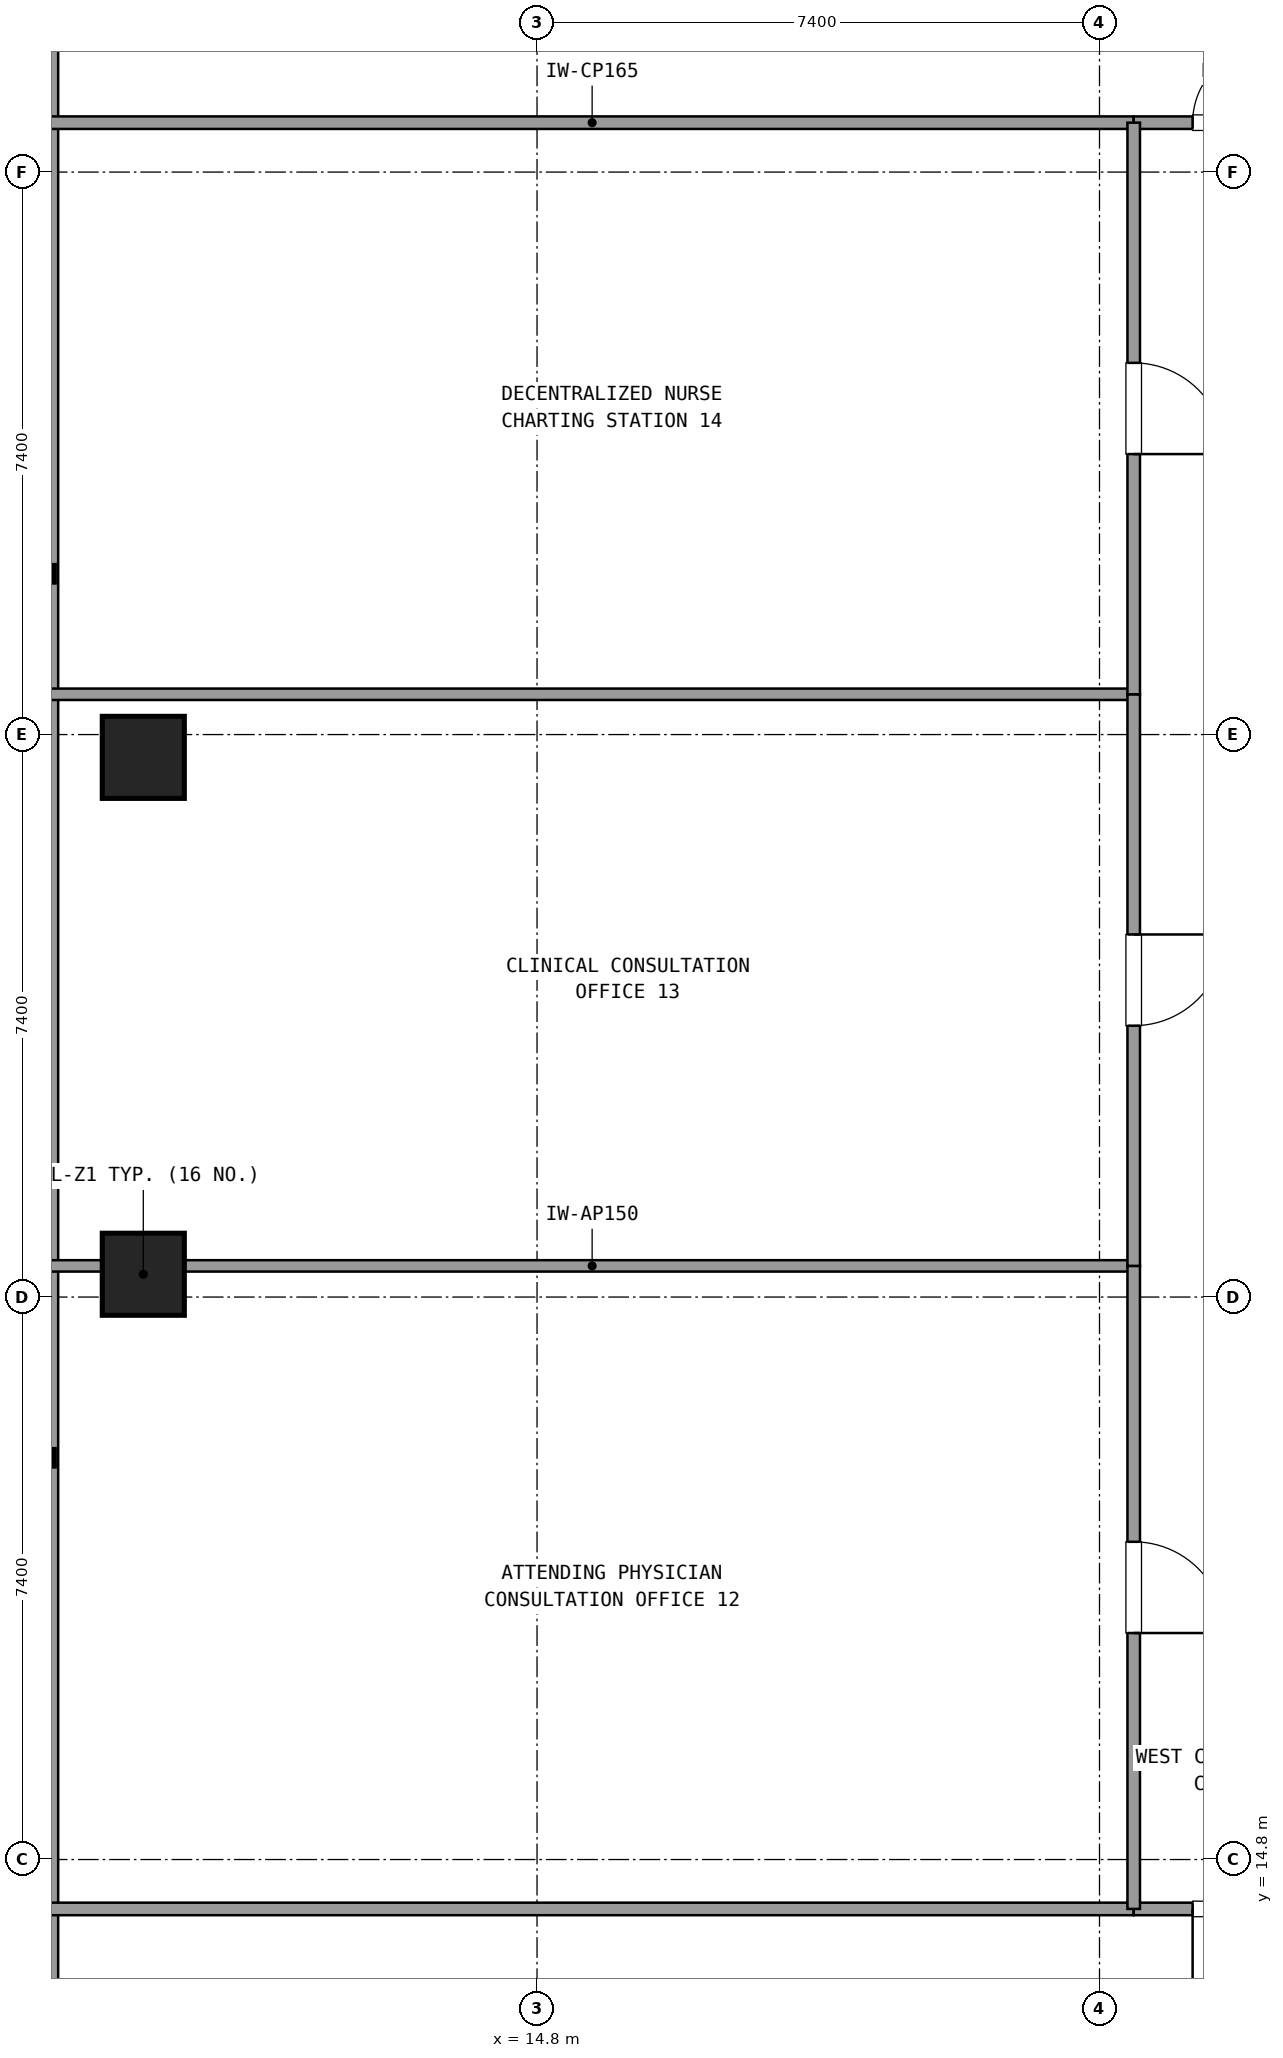
"""IFC4 building model, lengths in metres.
Left out: names, types, materials, properties, quantities, classifications, styles, units other than length and angle.
Written with IfcOpenShell. Run it as: python <this file> out.ifc"""

import sys

from ifc_helpers import new_model, si_unit, direction, frame, frame_2d, origin, origin_2d, place, context, subcontext, project, spatial, rectangle, extrude, element, fill, save


model = new_model("IFC4")
c1 = context("Model", 3, precision=1e-05, world=origin(), true_north=direction((0.0, 1.0)))
c2 = subcontext(c1, "Body", "Model", "MODEL_VIEW")
j1 = project(units=[si_unit("LENGTHUNIT", "METRE"), si_unit("PLANEANGLEUNIT", "RADIAN")], contexts=[c1])
p1 = place(None, origin())
s1 = spatial("IfcSite", under=j1, at=p1, CompositionType="ELEMENT")
p2 = place(p1, origin())
s2 = spatial("IfcBuilding", under=s1, at=p2, CompositionType="ELEMENT")
p3 = place(p2, frame((0.0, 0.0, 31.14)))
s3 = spatial("IfcBuildingStorey", under=s2, at=p3, CompositionType="ELEMENT", Elevation=31.14)
for number, where, z_axis, x_axis in (
    (1, (9.62, 22.5, 0.0), (0.0, 0.0, 1.0), (1.0, 0.0, 0.0)),
    (2, (9.62, 29.3, 0.0), (0.0, 0.0, 1.0), (1.0, 0.0, 0.0)),
):
    element("IfcColumn", number, at=place(p3, frame(where, z_axis=z_axis, x_axis=x_axis)), inside=s3, PredefinedType="COLUMN", context=c2, shape_type="SweptSolid", body=[
        extrude(rectangle(XDim=1.08, YDim=1.08, at=origin_2d()), origin(), (0.0, 0.0, 1.0), 3.6),
    ])
p4 = place(p3, frame((8.38, 43.345, 0.0), z_axis=(0.0, 0.0, 1.0), x_axis=(0.0, -1.0, 0.0)))
e3 = element("IfcWall", 3, at=p4, inside=s3, PredefinedType="SOLIDWALL", context=c2, shape_type="SweptSolid", body=[
    extrude(rectangle(XDim=34.89, YDim=0.24, at=frame_2d((17.445, 0.0))), origin(), (0.0, 0.0, 1.0), 0.85),
])
for number, where, z_axis, x_axis in (
    (4, (8.4, 37.65, 0.0), (0.0, 0.0, 1.0), (1.0, 0.0, 0.0)),
    (5, (8.4, 14.15, 0.0), (0.0, 0.0, 1.0), (1.0, 0.0, 0.0)),
):
    element("IfcWall", number, at=place(p3, frame(where, z_axis=z_axis, x_axis=x_axis)), inside=s3, PredefinedType="PARTITIONING", context=c2, shape_type="SweptSolid", body=[
        extrude(rectangle(XDim=14.25, YDim=0.165, at=frame_2d((7.125, 0.0))), origin(), (0.0, 0.0, 1.0), 2.61),
    ])
p5 = place(p3, frame((22.65, 37.65, 0.0), z_axis=(0.0, 0.0, 1.0), x_axis=(1.0, 0.0, 0.0)))
e6 = element("IfcWall", 6, at=p5, inside=s3, PredefinedType="PARTITIONING", context=c2, shape_type="SweptSolid", body=[
    extrude(rectangle(XDim=2.55, YDim=0.165, at=frame_2d((1.275, 0.0))), origin(), (0.0, 0.0, 1.0), 2.61),
])
p6 = place(p5, frame((0.775, 0.0, 0.0)))
e7 = element("IfcOpeningElement", 7, at=p6, cuts=e6, PredefinedType="OPENING", context=c2, shape_type="SweptSolid", body=[
    extrude(rectangle(XDim=1.0, YDim=2.15, at=frame_2d((0.5, 1.075))), frame((0.0, 0.093, 0.0), z_axis=(0.0, -1.0, 0.0), x_axis=(1.0, 0.0, 0.0)), (0.0, 0.0, 1.0), 0.185),
])
p7 = place(p3, frame((22.65, 14.15, 0.0), z_axis=(0.0, 0.0, 1.0), x_axis=(1.0, 0.0, 0.0)))
e8 = element("IfcWall", 8, at=p7, inside=s3, PredefinedType="PARTITIONING", context=c2, shape_type="SweptSolid", body=[
    extrude(rectangle(XDim=2.55, YDim=0.165, at=frame_2d((1.275, 0.0))), origin(), (0.0, 0.0, 1.0), 2.61),
])
p8 = place(p7, frame((0.775, 0.0, 0.0)))
e9 = element("IfcOpeningElement", 9, at=p8, cuts=e8, PredefinedType="OPENING", context=c2, shape_type="SweptSolid", body=[
    extrude(rectangle(XDim=1.0, YDim=2.15, at=frame_2d((0.5, 1.075))), frame((0.0, 0.093, 0.0), z_axis=(0.0, -1.0, 0.0), x_axis=(1.0, 0.0, 0.0)), (0.0, 0.0, 1.0), 0.185),
])
p9 = place(p3, frame((22.65, 22.61, 0.0), z_axis=(0.0, 0.0, 1.0), x_axis=(-1.0, 0.0, 0.0)))
e10 = element("IfcWall", 10, at=p9, inside=s3, PredefinedType="PARTITIONING", context=c2, shape_type="SweptSolid", body=[
    extrude(rectangle(XDim=14.25, YDim=0.15, at=frame_2d((7.125, 0.0))), origin(), (0.0, 0.0, 1.0), 2.61),
])
p10 = place(p3, frame((22.65, 14.15, 0.0), z_axis=(0.0, 0.0, 1.0), x_axis=(0.0, 1.0, 0.0)))
e11 = element("IfcWall", 11, at=p10, inside=s3, PredefinedType="PARTITIONING", context=c2, shape_type="SweptSolid", body=[
    extrude(rectangle(XDim=8.46, YDim=0.165, at=frame_2d((4.23, 0.0))), origin(), (0.0, 0.0, 1.0), 2.61),
])
p11 = place(p10, frame((3.63, 0.0, 0.0)))
e12 = element("IfcOpeningElement", 12, at=p11, cuts=e11, PredefinedType="OPENING", context=c2, shape_type="SweptSolid", body=[
    extrude(rectangle(XDim=1.2, YDim=2.15, at=frame_2d((0.6, 1.075))), frame((0.0, 0.093, 0.0), z_axis=(0.0, -1.0, 0.0), x_axis=(1.0, 0.0, 0.0)), (0.0, 0.0, 1.0), 0.185),
])
p12 = place(p3, frame((22.65, 30.13, 0.0), z_axis=(0.0, 0.0, 1.0), x_axis=(-1.0, 0.0, 0.0)))
e13 = element("IfcWall", 13, at=p12, inside=s3, PredefinedType="PARTITIONING", context=c2, shape_type="SweptSolid", body=[
    extrude(rectangle(XDim=14.25, YDim=0.15, at=frame_2d((7.125, 0.0))), origin(), (0.0, 0.0, 1.0), 2.61),
])
p13 = place(p3, frame((22.65, 22.61, 0.0), z_axis=(0.0, 0.0, 1.0), x_axis=(0.0, 1.0, 0.0)))
e14 = element("IfcWall", 14, at=p13, inside=s3, PredefinedType="PARTITIONING", context=c2, shape_type="SweptSolid", body=[
    extrude(rectangle(XDim=7.52, YDim=0.165, at=frame_2d((3.76, 0.0))), origin(), (0.0, 0.0, 1.0), 2.61),
])
p14 = place(p13, frame((3.16, 0.0, 0.0)))
e15 = element("IfcOpeningElement", 15, at=p14, cuts=e14, PredefinedType="OPENING", context=c2, shape_type="SweptSolid", body=[
    extrude(rectangle(XDim=1.2, YDim=2.15, at=frame_2d((0.6, 1.075))), frame((0.0, 0.093, 0.0), z_axis=(0.0, -1.0, 0.0), x_axis=(1.0, 0.0, 0.0)), (0.0, 0.0, 1.0), 0.185),
])
p15 = place(p3, frame((22.65, 30.13, 0.0), z_axis=(0.0, 0.0, 1.0), x_axis=(0.0, 1.0, 0.0)))
e16 = element("IfcWall", 16, at=p15, inside=s3, PredefinedType="PARTITIONING", context=c2, shape_type="SweptSolid", body=[
    extrude(rectangle(XDim=7.52, YDim=0.165, at=frame_2d((3.76, 0.0))), origin(), (0.0, 0.0, 1.0), 2.61),
])
p16 = place(p15, frame((3.16, 0.0, 0.0)))
e17 = element("IfcOpeningElement", 17, at=p16, cuts=e16, PredefinedType="OPENING", context=c2, shape_type="SweptSolid", body=[
    extrude(rectangle(XDim=1.2, YDim=2.15, at=frame_2d((0.6, 1.075))), frame((0.0, 0.093, 0.0), z_axis=(0.0, -1.0, 0.0), x_axis=(1.0, 0.0, 0.0)), (0.0, 0.0, 1.0), 0.185),
])
p17 = place(p6, origin())
e18 = element("IfcDoor", 18, at=p17, inside=s3, OperationType="SINGLE_SWING_RIGHT", PredefinedType="DOOR", context=c2, shape_type="SweptSolid", body=[
    extrude(rectangle(XDim=1.0, YDim=2.15, at=frame_2d((0.5, 1.075))), frame((0.0, 0.025, 0.0), z_axis=(0.0, -1.0, 0.0), x_axis=(1.0, 0.0, 0.0)), (0.0, 0.0, 1.0), 0.05),
])
fill(e7, e18)
p18 = place(p8, frame((1.0, 0.0, 0.0), z_axis=(0.0, 0.0, 1.0), x_axis=(-1.0, 0.0, 0.0)))
e19 = element("IfcDoor", 19, at=p18, inside=s3, OperationType="SINGLE_SWING_LEFT", PredefinedType="DOOR", context=c2, shape_type="SweptSolid", body=[
    extrude(rectangle(XDim=1.0, YDim=2.15, at=frame_2d((0.5, 1.075))), frame((0.0, 0.025, 0.0), z_axis=(0.0, -1.0, 0.0), x_axis=(1.0, 0.0, 0.0)), (0.0, 0.0, 1.0), 0.05),
])
fill(e9, e19)
p19 = place(p11, frame((1.2, 0.0, 0.0), z_axis=(0.0, 0.0, 1.0), x_axis=(-1.0, 0.0, 0.0)))
e20 = element("IfcDoor", 20, at=p19, inside=s3, OperationType="SINGLE_SWING_LEFT", PredefinedType="DOOR", context=c2, shape_type="SweptSolid", body=[
    extrude(rectangle(XDim=1.2, YDim=2.15, at=frame_2d((0.6, 1.075))), frame((0.0, 0.025, 0.0), z_axis=(0.0, -1.0, 0.0), x_axis=(1.0, 0.0, 0.0)), (0.0, 0.0, 1.0), 0.05),
])
fill(e12, e20)
p20 = place(p14, frame((1.2, 0.0, 0.0), z_axis=(0.0, 0.0, 1.0), x_axis=(-1.0, 0.0, 0.0)))
e21 = element("IfcDoor", 21, at=p20, inside=s3, OperationType="SINGLE_SWING_RIGHT", PredefinedType="DOOR", context=c2, shape_type="SweptSolid", body=[
    extrude(rectangle(XDim=1.2, YDim=2.15, at=frame_2d((0.6, 1.075))), frame((0.0, 0.025, 0.0), z_axis=(0.0, -1.0, 0.0), x_axis=(1.0, 0.0, 0.0)), (0.0, 0.0, 1.0), 0.05),
])
fill(e15, e21)
p21 = place(p16, frame((1.2, 0.0, 0.0), z_axis=(0.0, 0.0, 1.0), x_axis=(-1.0, 0.0, 0.0)))
e22 = element("IfcDoor", 22, at=p21, inside=s3, OperationType="SINGLE_SWING_LEFT", PredefinedType="DOOR", context=c2, shape_type="SweptSolid", body=[
    extrude(rectangle(XDim=1.2, YDim=2.15, at=frame_2d((0.6, 1.075))), frame((0.0, 0.025, 0.0), z_axis=(0.0, -1.0, 0.0), x_axis=(1.0, 0.0, 0.0)), (0.0, 0.0, 1.0), 0.05),
])
fill(e17, e22)
save(model, sys.argv[1])
